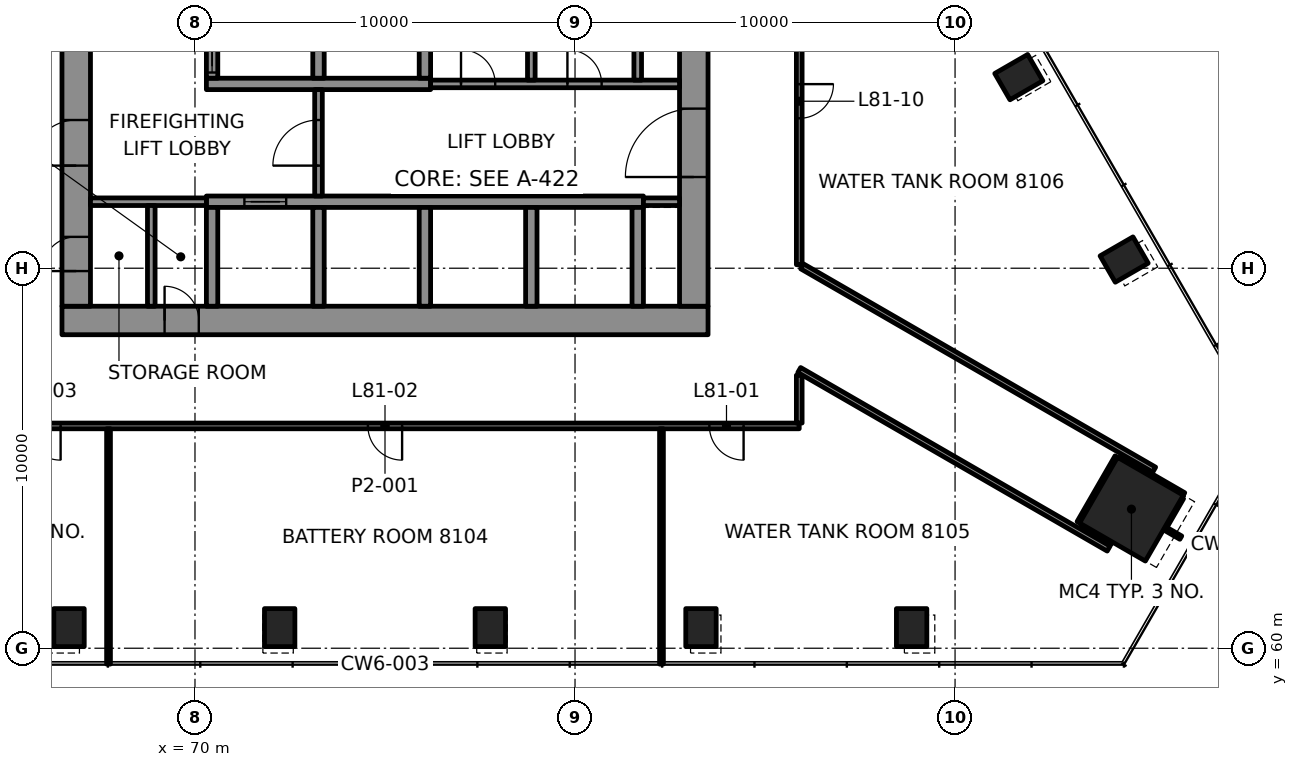
"""IFC4 building model, lengths in metres.
Left out: names, types, materials, properties, quantities, classifications, styles, units other than length and angle.
Written with IfcOpenShell. Run it as: python <this file> out.ifc"""

import sys

from ifc_helpers import new_model, si_unit, direction, frame, frame_2d, origin, origin_2d, place, context, subcontext, project, spatial, rectangle, hollow_rectangle, extrude, element, fill, save


model = new_model("IFC4")
c1 = context("Model", 3, precision=1e-05, world=origin(), true_north=direction((0.0, 1.0)))
c2 = subcontext(c1, "Body", "Model", "MODEL_VIEW")
j1 = project(units=[si_unit("LENGTHUNIT", "METRE"), si_unit("PLANEANGLEUNIT", "RADIAN")], contexts=[c1])
p1 = place(None, origin())
s1 = spatial("IfcSite", under=j1, at=p1, CompositionType="ELEMENT")
p2 = place(p1, origin())
s2 = spatial("IfcBuilding", under=s1, at=p2, CompositionType="ELEMENT")
p3 = place(p2, frame((0.0, 0.0, 331.6)))
s3 = spatial("IfcBuildingStorey", under=s2, at=p3, CompositionType="ELEMENT", Elevation=331.6)
p4 = place(p3, frame((94.641, 63.66, 0.0), z_axis=(0.0, 0.0, 1.0), x_axis=(0.5, 0.866025403784, 0.0)))
e1 = element("IfcColumn", 1, at=p4, inside=s3, PredefinedType="COLUMN", context=c2, shape_type="SweptSolid", body=[
    extrude(rectangle(XDim=2.0, YDim=2.0, at=origin_2d()), origin(), (0.0, 0.0, 1.0), 4.0),
])
for number, where, z_axis, x_axis in (
    (2, (66.686, 60.542, -0.0), (0.0, 0.0, 1.0), (1.0, 0.0, 0.0)),
    (3, (72.229, 60.542, -0.0), (0.0, 0.0, 1.0), (1.0, 0.0, 0.0)),
    (4, (77.771, 60.542, -0.0), (0.0, 0.0, 1.0), (1.0, 0.0, 0.0)),
    (5, (83.314, 60.542, -0.0), (0.0, 0.0, 1.0), (1.0, 0.0, 0.0)),
    (6, (88.857, 60.542, -0.0), (0.0, 0.0, 1.0), (1.0, 0.0, 0.0)),
    (7, (94.449, 70.228, -0.0), (0.0, 0.0, 1.0), (-0.5, 0.866, 0.0)),
    (8, (91.678, 75.028, -0.0), (0.0, 0.0, 1.0), (-0.5, 0.866, 0.0)),
):
    element("IfcColumn", number, at=place(p3, frame(where, z_axis=z_axis, x_axis=x_axis)), inside=s3, PredefinedType="COLUMN", context=c2, shape_type="SweptSolid", body=[
        extrude(hollow_rectangle(XDim=0.8, YDim=1.0, WallThickness=0.05, at=origin_2d()), origin(), (0.0, 0.0, 1.0), 4.0),
    ])
p5 = place(p3, frame((66.5, 68.625, 0.0), z_axis=(0.0, 0.0, 1.0), x_axis=(1.0, 0.0, 0.0)))
e9 = element("IfcWall", 9, at=p5, inside=s3, PredefinedType="SHEAR", context=c2, shape_type="SweptSolid", body=[
    extrude(rectangle(XDim=17.0, YDim=0.75, at=frame_2d((8.5, 0.0))), origin(), (0.0, 0.0, 1.0), 3.7),
])
p6 = place(p5, frame((2.7, 0.0, 0.0)))
e10 = element("IfcOpeningElement", 10, at=p6, cuts=e9, PredefinedType="OPENING", context=c2, shape_type="SweptSolid", body=[
    extrude(rectangle(XDim=0.9, YDim=2.1, at=frame_2d((0.45, 1.05))), frame((0.0, 0.385, 0.0), z_axis=(0.0, -1.0, 0.0), x_axis=(1.0, 0.0, 0.0)), (0.0, 0.0, 1.0), 0.77),
])
p7 = place(p3, frame((66.875, 69.0, 0.0), z_axis=(0.0, 0.0, 1.0), x_axis=(0.0, 1.0, 0.0)))
e11 = element("IfcWall", 11, at=p7, inside=s3, PredefinedType="SHEAR", context=c2, shape_type="SweptSolid", body=[
    extrude(rectangle(XDim=12.0, YDim=0.75, at=frame_2d((6.0, 0.0))), origin(), (0.0, 0.0, 1.0), 3.7),
])
p8 = place(p7, frame((3.7, 0.0, 0.0)))
e12 = element("IfcOpeningElement", 12, at=p8, cuts=e11, PredefinedType="OPENING", context=c2, shape_type="SweptSolid", body=[
    extrude(rectangle(XDim=1.2, YDim=2.1, at=frame_2d((0.6, 1.05))), frame((0.0, 0.385, 0.0), z_axis=(0.0, -1.0, 0.0), x_axis=(1.0, 0.0, 0.0)), (0.0, 0.0, 1.0), 0.77),
])
p9 = place(p7, frame((0.925, 0.0, 0.0)))
e13 = element("IfcOpeningElement", 13, at=p9, cuts=e11, PredefinedType="OPENING", context=c2, shape_type="SweptSolid", body=[
    extrude(rectangle(XDim=0.9, YDim=2.1, at=frame_2d((0.45, 1.05))), frame((0.0, 0.385, 0.0), z_axis=(0.0, -1.0, 0.0), x_axis=(1.0, 0.0, 0.0)), (0.0, 0.0, 1.0), 0.77),
])
p10 = place(p3, frame((83.125, 69.0, 0.0), z_axis=(0.0, 0.0, 1.0), x_axis=(0.0, 1.0, 0.0)))
e14 = element("IfcWall", 14, at=p10, inside=s3, PredefinedType="SHEAR", context=c2, shape_type="SweptSolid", body=[
    extrude(rectangle(XDim=12.0, YDim=0.75, at=frame_2d((6.0, 0.0))), origin(), (0.0, 0.0, 1.0), 3.7),
])
p11 = place(p10, frame((3.4, 0.0, 0.0)))
e15 = element("IfcOpeningElement", 15, at=p11, cuts=e14, PredefinedType="OPENING", context=c2, shape_type="SweptSolid", body=[
    extrude(rectangle(XDim=1.8, YDim=2.1, at=frame_2d((0.9, 1.05))), frame((0.0, 0.385, 0.0), z_axis=(0.0, -1.0, 0.0), x_axis=(1.0, 0.0, 0.0)), (0.0, 0.0, 1.0), 0.77),
])
p12 = place(p3, frame((70.3, 71.75, 0.0), z_axis=(0.0, 0.0, 1.0), x_axis=(1.0, 0.0, 0.0)))
e16 = element("IfcWall", 16, at=p12, inside=s3, PredefinedType="SHEAR", context=c2, shape_type="SweptSolid", body=[
    extrude(rectangle(XDim=11.5, YDim=0.3, at=frame_2d((5.75, 0.0))), origin(), (0.0, 0.0, 1.0), 3.7),
])
p13 = place(p12, frame((1.0, 0.0, 0.0)))
e17 = element("IfcOpeningElement", 17, at=p13, cuts=e16, PredefinedType="OPENING", context=c2, shape_type="SweptSolid", body=[
    extrude(rectangle(XDim=1.1, YDim=2.1, at=frame_2d((0.55, 1.05))), frame((0.0, 0.16, 0.0), z_axis=(0.0, -1.0, 0.0), x_axis=(1.0, 0.0, 0.0)), (0.0, 0.0, 1.0), 0.32),
])
p14 = place(p3, frame((70.3, 74.85, 0.0), z_axis=(0.0, 0.0, 1.0), x_axis=(1.0, 0.0, 0.0)))
e18 = element("IfcWall", 18, at=p14, inside=s3, PredefinedType="SHEAR", context=c2, shape_type="SweptSolid", body=[
    extrude(rectangle(XDim=5.9, YDim=0.3, at=frame_2d((2.95, 0.0))), origin(), (0.0, 0.0, 1.0), 3.7),
])
p15 = place(p3, frame((70.45, 69.0, 0.0), z_axis=(0.0, 0.0, 1.0), x_axis=(0.0, 1.0, 0.0)))
e19 = element("IfcWall", 19, at=p15, inside=s3, PredefinedType="SHEAR", context=c2, shape_type="SweptSolid", body=[
    extrude(rectangle(XDim=2.6, YDim=0.3, at=frame_2d((1.3, 0.0))), origin(), (0.0, 0.0, 1.0), 3.7),
])
p16 = place(p3, frame((70.45, 75.0, 0.0), z_axis=(0.0, 0.0, 1.0), x_axis=(0.0, 1.0, 0.0)))
e20 = element("IfcWall", 20, at=p16, inside=s3, PredefinedType="SHEAR", context=c2, shape_type="SweptSolid", body=[
    extrude(rectangle(XDim=2.6, YDim=0.3, at=frame_2d((1.3, 0.0))), origin(), (0.0, 0.0, 1.0), 3.7),
])
p17 = place(p16, frame((0.15, 0.0, 0.0)))
e21 = element("IfcOpeningElement", 21, at=p17, cuts=e20, PredefinedType="OPENING", context=c2, shape_type="SweptSolid", body=[
    extrude(rectangle(XDim=1.1, YDim=2.1, at=frame_2d((0.55, 1.05))), frame((0.0, 0.16, 0.0), z_axis=(0.0, -1.0, 0.0), x_axis=(1.0, 0.0, 0.0)), (0.0, 0.0, 1.0), 0.32),
])
for number, where, z_axis, x_axis in (
    (22, (73.25, 69.0, 0.0), (0.0, 0.0, 1.0), (0.0, 1.0, 0.0)),
    (23, (73.25, 75.0, 0.0), (0.0, 0.0, 1.0), (0.0, 1.0, 0.0)),
    (24, (76.05, 69.0, 0.0), (0.0, 0.0, 1.0), (0.0, 1.0, 0.0)),
    (25, (76.05, 75.0, 0.0), (0.0, 0.0, 1.0), (0.0, 1.0, 0.0)),
    (26, (78.85, 69.0, 0.0), (0.0, 0.0, 1.0), (0.0, 1.0, 0.0)),
    (27, (81.65, 69.0, 0.0), (0.0, 0.0, 1.0), (0.0, 1.0, 0.0)),
):
    element("IfcWall", number, at=place(p3, frame(where, z_axis=z_axis, x_axis=x_axis)), inside=s3, PredefinedType="SHEAR", context=c2, shape_type="SweptSolid", body=[
        extrude(rectangle(XDim=2.6, YDim=0.3, at=frame_2d((1.3, 0.0))), origin(), (0.0, 0.0, 1.0), 3.7),
    ])
p18 = place(p3, frame((85.899, 65.85, 0.0), z_axis=(0.0, 0.0, 1.0), x_axis=(-1.0, 0.0, 0.0)))
e28 = element("IfcWall", 28, at=p18, inside=s3, PredefinedType="PARTITIONING", context=c2, shape_type="SweptSolid", body=[
    extrude(rectangle(XDim=21.799, YDim=0.15, at=frame_2d((10.899, 0.0))), origin(), (0.0, 0.0, 1.0), 3.1),
])
p19 = place(p18, frame((1.464, 0.0, 0.0)))
e29 = element("IfcOpeningElement", 29, at=p19, cuts=e28, PredefinedType="OPENING", context=c2, shape_type="SweptSolid", body=[
    extrude(rectangle(XDim=0.9, YDim=2.1, at=frame_2d((0.45, 1.05))), frame((0.0, 0.085, 0.0), z_axis=(0.0, -1.0, 0.0), x_axis=(1.0, 0.0, 0.0)), (0.0, 0.0, 1.0), 0.17),
])
p20 = place(p18, frame((10.449, 0.0, 0.0)))
e30 = element("IfcOpeningElement", 30, at=p20, cuts=e28, PredefinedType="OPENING", context=c2, shape_type="SweptSolid", body=[
    extrude(rectangle(XDim=0.9, YDim=2.1, at=frame_2d((0.45, 1.05))), frame((0.0, 0.085, 0.0), z_axis=(0.0, -1.0, 0.0), x_axis=(1.0, 0.0, 0.0)), (0.0, 0.0, 1.0), 0.17),
])
p21 = place(p18, frame((19.435, 0.0, 0.0)))
e31 = element("IfcOpeningElement", 31, at=p21, cuts=e28, PredefinedType="OPENING", context=c2, shape_type="SweptSolid", body=[
    extrude(rectangle(XDim=0.9, YDim=2.1, at=frame_2d((0.45, 1.05))), frame((0.0, 0.085, 0.0), z_axis=(0.0, -1.0, 0.0), x_axis=(1.0, 0.0, 0.0)), (0.0, 0.0, 1.0), 0.17),
])
p22 = place(p3, frame((95.508, 63.16, 0.0), z_axis=(0.0, 0.0, 1.0), x_axis=(0.499859604386, 0.866106446058, 0.0)))
e32 = element("IfcWall", 32, at=p22, inside=s3, PredefinedType="PARTITIONING", context=c2, shape_type="SweptSolid", body=[
    extrude(rectangle(XDim=0.925, YDim=0.1, at=frame_2d((0.462, 0.0))), origin(), (0.0, 0.0, 1.0), 3.1),
])
p23 = place(p3, frame((93.276, 63.294, 0.0), z_axis=(0.0, 0.0, 1.0), x_axis=(0.499909240568, 0.866077797426, 0.0)))
e33 = element("IfcWall", 33, at=p23, inside=s3, PredefinedType="PARTITIONING", context=c2, shape_type="SweptSolid", body=[
    extrude(rectangle(XDim=1.999, YDim=0.15, at=frame_2d((1.0, 0.0))), origin(), (0.0, 0.0, 1.0), 3.097),
])
p24 = place(p3, frame((85.9, 65.926, 0.0), z_axis=(0.0, 0.0, 1.0), x_axis=(0.0, 1.0, 0.0)))
e34 = element("IfcWall", 34, at=p24, inside=s3, PredefinedType="PARTITIONING", context=c2, shape_type="SweptSolid", body=[
    extrude(rectangle(XDim=1.259, YDim=0.15, at=frame_2d((0.629, 0.0))), origin(), (0.0, 0.0, 1.0), 3.097),
])
p25 = place(p3, frame((85.9, 84.036, 0.0), z_axis=(0.0, 0.0, 1.0), x_axis=(0.0, -1.0, 0.0)))
e35 = element("IfcWall", 35, at=p25, inside=s3, PredefinedType="PARTITIONING", context=c2, shape_type="SweptSolid", body=[
    extrude(rectangle(XDim=13.943, YDim=0.15, at=frame_2d((6.972, 0.0))), origin(), (0.0, 0.0, 1.0), 3.1),
])
p26 = place(p25, frame((2.423, 0.0, 0.0)))
e36 = element("IfcOpeningElement", 36, at=p26, cuts=e35, PredefinedType="OPENING", context=c2, shape_type="SweptSolid", body=[
    extrude(rectangle(XDim=0.9, YDim=2.1, at=frame_2d((0.45, 1.05))), frame((0.0, 0.085, 0.0), z_axis=(0.0, -1.0, 0.0), x_axis=(1.0, 0.0, 0.0)), (0.0, 0.0, 1.0), 0.17),
])
p27 = place(p25, frame((9.191, 0.0, 0.0)))
e37 = element("IfcOpeningElement", 37, at=p27, cuts=e35, PredefinedType="OPENING", context=c2, shape_type="SweptSolid", body=[
    extrude(rectangle(XDim=0.9, YDim=2.1, at=frame_2d((0.45, 1.05))), frame((0.0, 0.085, 0.0), z_axis=(0.0, -1.0, 0.0), x_axis=(1.0, 0.0, 0.0)), (0.0, 0.0, 1.0), 0.17),
])
for number, where, z_axis, x_axis in (
    (38, (82.275, 59.583, 0.0), (0.0, 0.0, 1.0), (0.0, 1.0, 0.0)),
    (39, (67.725, 59.583, 0.0), (0.0, 0.0, 1.0), (0.0, 1.0, 0.0)),
):
    element("IfcWall", number, at=place(p3, frame(where, z_axis=z_axis, x_axis=x_axis)), inside=s3, PredefinedType="PARTITIONING", context=c2, shape_type="SweptSolid", body=[
        extrude(rectangle(XDim=6.192, YDim=0.1, at=frame_2d((3.096, 0.0))), origin(), (0.0, 0.0, 1.0), 3.088),
    ])
p28 = place(p3, frame((95.241, 64.7, 0.0), z_axis=(0.0, 0.0, 1.0), x_axis=(-0.866021425885, 0.500006889861, 0.0)))
e40 = element("IfcWall", 40, at=p28, inside=s3, PredefinedType="PARTITIONING", context=c2, shape_type="SweptSolid", body=[
    extrude(rectangle(XDim=10.699, YDim=0.15, at=frame_2d((5.35, 0.0))), origin(), (0.0, 0.0, 1.0), 3.1),
])
p29 = place(p3, frame((96.007, 64.027, 0.0), z_axis=(0.0, 0.0, 1.0), x_axis=(-0.866048237946, 0.499960447986, 0.0)))
e41 = element("IfcWall", 41, at=p29, inside=s3, PredefinedType="PARTITIONING", context=c2, shape_type="SweptSolid", body=[
    extrude(rectangle(XDim=1.924, YDim=0.15, at=frame_2d((0.962, 0.0))), origin(), (0.0, 0.0, 1.0), 3.1),
])
p30 = place(p3, frame((95.94, 62.91, 0.0), z_axis=(0.0, 0.0, 1.0), x_axis=(-0.865945212559, 0.500138869561, 0.0)))
e42 = element("IfcWall", 42, at=p30, inside=s3, PredefinedType="PARTITIONING", context=c2, shape_type="SweptSolid", body=[
    extrude(rectangle(XDim=0.44, YDim=0.1, at=frame_2d((0.22, 0.0))), origin(), (0.0, 0.0, 1.0), 3.1),
])
p31 = place(p3, frame((94.141, 62.794, 0.0), z_axis=(0.0, 0.0, 1.0), x_axis=(-0.865974401185, 0.500088328689, 0.0)))
e43 = element("IfcWall", 43, at=p31, inside=s3, PredefinedType="PARTITIONING", context=c2, shape_type="SweptSolid", body=[
    extrude(rectangle(XDim=0.924, YDim=0.15, at=frame_2d((0.462, 0.0))), origin(), (0.0, 0.0, 1.0), 3.1),
])
p32 = place(p3, frame((94.041, 62.621, 0.0), z_axis=(0.0, 0.0, 1.0), x_axis=(-0.866027286158, 0.499996739618, 0.0)))
e44 = element("IfcWall", 44, at=p32, inside=s3, PredefinedType="PARTITIONING", context=c2, shape_type="SweptSolid", body=[
    extrude(rectangle(XDim=9.4, YDim=0.15, at=frame_2d((4.7, 0.0))), origin(), (0.0, 0.0, 1.0), 3.097),
])
p33 = place(p3, frame((67.25, 71.75, 0.0), z_axis=(0.0, 0.0, 1.0), x_axis=(1.0, 0.0, 0.0)))
e45 = element("IfcWall", 45, at=p33, inside=s3, PredefinedType="PARTITIONING", context=c2, shape_type="SweptSolid", body=[
    extrude(rectangle(XDim=3.05, YDim=0.2, at=frame_2d((1.525, 0.0))), origin(), (0.0, 0.0, 1.0), 3.7),
])
p34 = place(p3, frame((81.8, 71.75, 0.0), z_axis=(0.0, 0.0, 1.0), x_axis=(1.0, 0.0, 0.0)))
e46 = element("IfcWall", 46, at=p34, inside=s3, PredefinedType="PARTITIONING", context=c2, shape_type="SweptSolid", body=[
    extrude(rectangle(XDim=0.95, YDim=0.2, at=frame_2d((0.475, 0.0))), origin(), (0.0, 0.0, 1.0), 3.7),
])
p35 = place(p3, frame((76.2, 74.85, 0.0), z_axis=(0.0, 0.0, 1.0), x_axis=(1.0, 0.0, 0.0)))
e47 = element("IfcWall", 47, at=p35, inside=s3, PredefinedType="PARTITIONING", context=c2, shape_type="SweptSolid", body=[
    extrude(rectangle(XDim=6.55, YDim=0.2, at=frame_2d((3.275, 0.0))), origin(), (0.0, 0.0, 1.0), 3.7),
])
p36 = place(p35, frame((0.8, 0.0, 0.0)))
e48 = element("IfcOpeningElement", 48, at=p36, cuts=e47, PredefinedType="OPENING", context=c2, shape_type="SweptSolid", body=[
    extrude(rectangle(XDim=0.9, YDim=2.1, at=frame_2d((0.45, 1.05))), frame((0.0, 0.11, 0.0), z_axis=(0.0, -1.0, 0.0), x_axis=(1.0, 0.0, 0.0)), (0.0, 0.0, 1.0), 0.22),
])
p37 = place(p35, frame((3.6, 0.0, 0.0)))
e49 = element("IfcOpeningElement", 49, at=p37, cuts=e47, PredefinedType="OPENING", context=c2, shape_type="SweptSolid", body=[
    extrude(rectangle(XDim=0.9, YDim=2.1, at=frame_2d((0.45, 1.05))), frame((0.0, 0.11, 0.0), z_axis=(0.0, -1.0, 0.0), x_axis=(1.0, 0.0, 0.0)), (0.0, 0.0, 1.0), 0.22),
])
p38 = place(p3, frame((68.85, 69.0, 0.0), z_axis=(0.0, 0.0, 1.0), x_axis=(0.0, 1.0, 0.0)))
e50 = element("IfcWall", 50, at=p38, inside=s3, PredefinedType="PARTITIONING", context=c2, shape_type="SweptSolid", body=[
    extrude(rectangle(XDim=2.65, YDim=0.2, at=frame_2d((1.325, 0.0))), origin(), (0.0, 0.0, 1.0), 3.7),
])
p39 = place(p3, frame((73.25, 71.9, 0.0), z_axis=(0.0, 0.0, 1.0), x_axis=(0.0, 1.0, 0.0)))
e51 = element("IfcWall", 51, at=p39, inside=s3, PredefinedType="PARTITIONING", context=c2, shape_type="SweptSolid", body=[
    extrude(rectangle(XDim=2.8, YDim=0.2, at=frame_2d((1.4, 0.0))), origin(), (0.0, 0.0, 1.0), 3.7),
])
p40 = place(p39, frame((0.8, 0.0, 0.0)))
e52 = element("IfcOpeningElement", 52, at=p40, cuts=e51, PredefinedType="OPENING", context=c2, shape_type="SweptSolid", body=[
    extrude(rectangle(XDim=1.2, YDim=2.1, at=frame_2d((0.6, 1.05))), frame((0.0, 0.11, 0.0), z_axis=(0.0, -1.0, 0.0), x_axis=(1.0, 0.0, 0.0)), (0.0, 0.0, 1.0), 0.22),
])
for number, where, z_axis, x_axis in (
    (53, (78.85, 74.95, 0.0), (0.0, 0.0, 1.0), (0.0, 1.0, 0.0)),
    (54, (81.65, 74.95, 0.0), (0.0, 0.0, 1.0), (0.0, 1.0, 0.0)),
):
    element("IfcWall", number, at=place(p3, frame(where, z_axis=z_axis, x_axis=x_axis)), inside=s3, PredefinedType="PARTITIONING", context=c2, shape_type="SweptSolid", body=[
        extrude(rectangle(XDim=2.65, YDim=0.2, at=frame_2d((1.325, 0.0))), origin(), (0.0, 0.0, 1.0), 3.7),
    ])
p41 = place(p19, origin())
e55 = element("IfcDoor", 55, at=p41, inside=s3, OperationType="SINGLE_SWING_LEFT", PredefinedType="DOOR", context=c2, shape_type="SweptSolid", body=[
    extrude(rectangle(XDim=0.9, YDim=2.1, at=frame_2d((0.45, 1.05))), frame((0.0, 0.025, 0.0), z_axis=(0.0, -1.0, 0.0), x_axis=(1.0, 0.0, 0.0)), (0.0, 0.0, 1.0), 0.05),
])
fill(e29, e55)
p42 = place(p20, origin())
e56 = element("IfcDoor", 56, at=p42, inside=s3, OperationType="SINGLE_SWING_RIGHT", PredefinedType="DOOR", context=c2, shape_type="SweptSolid", body=[
    extrude(rectangle(XDim=0.9, YDim=2.1, at=frame_2d((0.45, 1.05))), frame((0.0, 0.025, 0.0), z_axis=(0.0, -1.0, 0.0), x_axis=(1.0, 0.0, 0.0)), (0.0, 0.0, 1.0), 0.05),
])
fill(e30, e56)
p43 = place(p21, origin())
e57 = element("IfcDoor", 57, at=p43, inside=s3, OperationType="SINGLE_SWING_LEFT", PredefinedType="DOOR", context=c2, shape_type="SweptSolid", body=[
    extrude(rectangle(XDim=0.9, YDim=2.1, at=frame_2d((0.45, 1.05))), frame((0.0, 0.025, 0.0), z_axis=(0.0, -1.0, 0.0), x_axis=(1.0, 0.0, 0.0)), (0.0, 0.0, 1.0), 0.05),
])
fill(e31, e57)
p44 = place(p27, origin())
e58 = element("IfcDoor", 58, at=p44, inside=s3, OperationType="SINGLE_SWING_RIGHT", PredefinedType="DOOR", context=c2, shape_type="SweptSolid", body=[
    extrude(rectangle(XDim=0.9, YDim=2.1, at=frame_2d((0.45, 1.05))), frame((0.0, 0.025, 0.0), z_axis=(0.0, -1.0, 0.0), x_axis=(1.0, 0.0, 0.0)), (0.0, 0.0, 1.0), 0.05),
])
fill(e37, e58)
p45 = place(p13, origin())
e59 = element("IfcDoor", 59, at=p45, inside=s3, OperationType="DOUBLE_DOOR_SLIDING", PredefinedType="DOOR", context=c2, shape_type="SweptSolid", body=[
    extrude(rectangle(XDim=1.1, YDim=2.1, at=frame_2d((0.55, 1.05))), frame((0.0, 0.025, 0.0), z_axis=(0.0, -1.0, 0.0), x_axis=(1.0, 0.0, 0.0)), (0.0, 0.0, 1.0), 0.05),
])
fill(e17, e59)
p46 = place(p17, origin())
e60 = element("IfcDoor", 60, at=p46, inside=s3, OperationType="DOUBLE_DOOR_SLIDING", PredefinedType="DOOR", context=c2, shape_type="SweptSolid", body=[
    extrude(rectangle(XDim=1.1, YDim=2.1, at=frame_2d((0.55, 1.05))), frame((0.0, 0.025, 0.0), z_axis=(0.0, -1.0, 0.0), x_axis=(1.0, 0.0, 0.0)), (0.0, 0.0, 1.0), 0.05),
])
fill(e21, e60)
p47 = place(p40, origin())
e61 = element("IfcDoor", 61, at=p47, inside=s3, OperationType="SINGLE_SWING_LEFT", PredefinedType="DOOR", context=c2, shape_type="SweptSolid", body=[
    extrude(rectangle(XDim=1.2, YDim=2.1, at=frame_2d((0.6, 1.05))), frame((0.0, 0.025, 0.0), z_axis=(0.0, -1.0, 0.0), x_axis=(1.0, 0.0, 0.0)), (0.0, 0.0, 1.0), 0.05),
])
fill(e52, e61)
p48 = place(p8, origin())
e62 = element("IfcDoor", 62, at=p48, inside=s3, OperationType="SINGLE_SWING_RIGHT", PredefinedType="DOOR", context=c2, shape_type="SweptSolid", body=[
    extrude(rectangle(XDim=1.2, YDim=2.1, at=frame_2d((0.6, 1.05))), frame((0.0, 0.095, 0.0), z_axis=(0.0, -1.0, 0.0), x_axis=(1.0, 0.0, 0.0)), (0.0, 0.0, 1.0), 0.19),
])
fill(e12, e62)
p49 = place(p11, origin())
e63 = element("IfcDoor", 63, at=p49, inside=s3, OperationType="SINGLE_SWING_LEFT", PredefinedType="DOOR", context=c2, shape_type="SweptSolid", body=[
    extrude(rectangle(XDim=1.8, YDim=2.1, at=frame_2d((0.9, 1.05))), frame((0.0, 0.095, 0.0), z_axis=(0.0, -1.0, 0.0), x_axis=(1.0, 0.0, 0.0)), (0.0, 0.0, 1.0), 0.19),
])
fill(e15, e63)
p50 = place(p9, origin())
e64 = element("IfcDoor", 64, at=p50, inside=s3, OperationType="SINGLE_SWING_RIGHT", PredefinedType="DOOR", context=c2, shape_type="SweptSolid", body=[
    extrude(rectangle(XDim=0.9, YDim=2.1, at=frame_2d((0.45, 1.05))), frame((0.0, 0.095, 0.0), z_axis=(0.0, -1.0, 0.0), x_axis=(1.0, 0.0, 0.0)), (0.0, 0.0, 1.0), 0.19),
])
fill(e13, e64)
p51 = place(p6, origin())
e65 = element("IfcDoor", 65, at=p51, inside=s3, OperationType="SINGLE_SWING_LEFT", PredefinedType="DOOR", context=c2, shape_type="SweptSolid", body=[
    extrude(rectangle(XDim=0.9, YDim=2.1, at=frame_2d((0.45, 1.05))), frame((0.0, 0.095, 0.0), z_axis=(0.0, -1.0, 0.0), x_axis=(1.0, 0.0, 0.0)), (0.0, 0.0, 1.0), 0.19),
])
fill(e10, e65)
p52 = place(p36, origin())
e66 = element("IfcDoor", 66, at=p52, inside=s3, OperationType="SINGLE_SWING_RIGHT", PredefinedType="DOOR", context=c2, shape_type="SweptSolid", body=[
    extrude(rectangle(XDim=0.9, YDim=2.1, at=frame_2d((0.45, 1.05))), frame((0.0, 0.025, 0.0), z_axis=(0.0, -1.0, 0.0), x_axis=(1.0, 0.0, 0.0)), (0.0, 0.0, 1.0), 0.05),
])
fill(e48, e66)
p53 = place(p37, origin())
e67 = element("IfcDoor", 67, at=p53, inside=s3, OperationType="SINGLE_SWING_LEFT", PredefinedType="DOOR", context=c2, shape_type="SweptSolid", body=[
    extrude(rectangle(XDim=0.9, YDim=2.1, at=frame_2d((0.45, 1.05))), frame((0.0, 0.025, 0.0), z_axis=(0.0, -1.0, 0.0), x_axis=(1.0, 0.0, 0.0)), (0.0, 0.0, 1.0), 0.05),
])
fill(e49, e67)
save(model, sys.argv[1])
